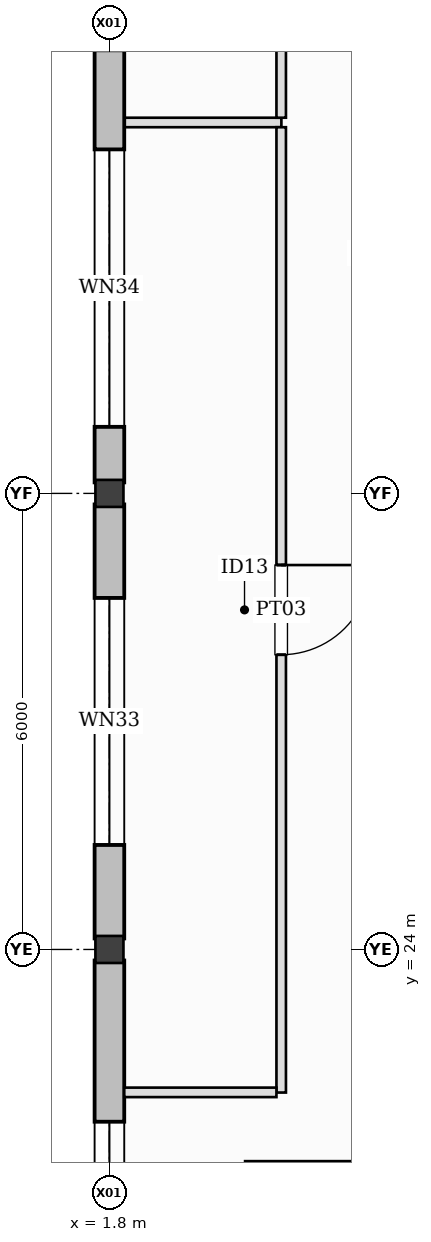
"""IFC4 building model, lengths in metres.
Left out: names, types, materials, properties, quantities, classifications, styles, units other than length and angle.
Written with IfcOpenShell. Run it as: python <this file> out.ifc"""

import sys

from ifc_helpers import new_model, si_unit, direction, frame, frame_2d, origin, origin_2d, place, context, subcontext, project, spatial, rectangle, i_section, extrude, element, fill, save


model = new_model("IFC4")
c1 = context("Model", 3, precision=1e-05, world=origin(), true_north=direction((0.0, 1.0)))
c2 = subcontext(c1, "Body", "Model", "MODEL_VIEW")
j1 = project(units=[si_unit("LENGTHUNIT", "METRE"), si_unit("PLANEANGLEUNIT", "RADIAN")], contexts=[c1])
p1 = place(None, origin())
s1 = spatial("IfcSite", under=j1, at=p1, CompositionType="ELEMENT")
p2 = place(p1, origin())
s2 = spatial("IfcBuilding", under=s1, at=p2, CompositionType="ELEMENT")
p3 = place(p2, origin())
s3 = spatial("IfcBuildingStorey", under=s2, at=p3, CompositionType="ELEMENT", Elevation=0.0)
for number, where, z_axis, x_axis in (
    (1, (1.8, 24.0, -0.41), (0.0, 0.0, 1.0), (1.0, 0.0, 0.0)),
    (2, (1.8, 30.0, -0.41), (0.0, 0.0, 1.0), (1.0, 0.0, 0.0)),
):
    element("IfcColumn", number, at=place(p3, frame(where, z_axis=z_axis, x_axis=x_axis)), inside=s3, PredefinedType="COLUMN", context=c2, shape_type="SweptSolid", body=[
        extrude(i_section(OverallWidth=0.369, OverallDepth=0.356, WebThickness=0.011, FlangeThickness=0.018, at=origin_2d()), origin(), (0.0, 0.0, 1.0), 6.41),
    ])
p4 = place(p3, frame((1.8, 23.855, 0.0), z_axis=(0.0, 0.0, 1.0), x_axis=(0.0, -1.0, 0.0)))
e3 = element("IfcWall", 3, at=p4, inside=s3, PredefinedType="STANDARD", context=c2, shape_type="SweptSolid", body=[
    extrude(rectangle(XDim=5.71, YDim=0.39, at=frame_2d((2.855, 0.0))), origin(), (0.0, 0.0, 1.0), 6.0),
])
p5 = place(p4, frame((2.121, 0.0, 1.0)))
e4 = element("IfcOpeningElement", 4, at=p5, cuts=e3, PredefinedType="OPENING", context=c2, shape_type="SweptSolid", body=[
    extrude(rectangle(XDim=2.85, YDim=1.08, at=frame_2d((1.425, 0.54))), frame((0.0, 0.205, 0.0), z_axis=(0.0, -1.0, 0.0), x_axis=(1.0, 0.0, 0.0)), (0.0, 0.0, 1.0), 0.41),
])
p6 = place(p3, frame((1.8, 29.855, 0.0), z_axis=(0.0, 0.0, 1.0), x_axis=(0.0, -1.0, 0.0)))
e5 = element("IfcWall", 5, at=p6, inside=s3, PredefinedType="STANDARD", context=c2, shape_type="SweptSolid", body=[
    extrude(rectangle(XDim=5.71, YDim=0.39, at=frame_2d((2.855, 0.0))), origin(), (0.0, 0.0, 1.0), 6.0),
])
p7 = place(p6, frame((1.23, 0.0, 1.0)))
e6 = element("IfcOpeningElement", 6, at=p7, cuts=e5, PredefinedType="OPENING", context=c2, shape_type="SweptSolid", body=[
    extrude(rectangle(XDim=3.25, YDim=1.08, at=frame_2d((1.625, 0.54))), frame((0.0, 0.205, 0.0), z_axis=(0.0, -1.0, 0.0), x_axis=(1.0, 0.0, 0.0)), (0.0, 0.0, 1.0), 0.41),
])
p8 = place(p3, frame((1.8, 35.855, 0.0), z_axis=(0.0, 0.0, 1.0), x_axis=(0.0, -1.0, 0.0)))
e7 = element("IfcWall", 7, at=p8, inside=s3, PredefinedType="STANDARD", context=c2, shape_type="SweptSolid", body=[
    extrude(rectangle(XDim=5.71, YDim=0.39, at=frame_2d((2.855, 0.0))), origin(), (0.0, 0.0, 1.0), 6.0),
])
p9 = place(p8, frame((1.329, 0.0, 1.0)))
e8 = element("IfcOpeningElement", 8, at=p9, cuts=e7, PredefinedType="OPENING", context=c2, shape_type="SweptSolid", body=[
    extrude(rectangle(XDim=3.65, YDim=1.08, at=frame_2d((1.825, 0.54))), frame((0.0, 0.205, 0.0), z_axis=(0.0, -1.0, 0.0), x_axis=(1.0, 0.0, 0.0)), (0.0, 0.0, 1.0), 0.41),
])
p10 = place(p3, frame((5.015, 21.115, 0.0), z_axis=(0.0, 0.0, 1.0), x_axis=(-1.0, 0.0, 0.0)))
e9 = element("IfcWall", 9, at=p10, inside=s3, PredefinedType="PARTITIONING", context=c2, shape_type="SweptSolid", body=[
    extrude(rectangle(XDim=1.43, YDim=0.2, at=frame_2d((0.715, 0.0))), origin(), (0.0, 0.0, 1.0), 5.68),
])
p11 = place(p3, frame((1.995, 34.88, 0.0), z_axis=(0.0, 0.0, 1.0), x_axis=(1.0, 0.0, 0.0)))
e10 = element("IfcWall", 10, at=p11, inside=s3, PredefinedType="PARTITIONING", context=c2, shape_type="SweptSolid", body=[
    extrude(rectangle(XDim=2.067, YDim=0.125, at=frame_2d((1.034, 0.0))), origin(), (0.0, 0.0, 1.0), 5.68),
])
p12 = place(p3, frame((4.06, 34.817, 0.0), z_axis=(0.0, 0.0, 1.0), x_axis=(0.0, -1.0, 0.0)))
e11 = element("IfcWall", 11, at=p12, inside=s3, PredefinedType="PARTITIONING", context=c2, shape_type="SweptSolid", body=[
    extrude(rectangle(XDim=12.7, YDim=0.125, at=frame_2d((6.35, 0.0))), origin(), (0.0, 0.0, 1.0), 5.68),
])
p13 = place(p12, frame((5.76, 0.0, 0.0)))
e12 = element("IfcOpeningElement", 12, at=p13, cuts=e11, PredefinedType="OPENING", context=c2, shape_type="SweptSolid", body=[
    extrude(rectangle(XDim=1.18, YDim=2.16, at=frame_2d((0.59, 1.08))), frame((0.0, 0.073, 0.0), z_axis=(0.0, -1.0, 0.0), x_axis=(1.0, 0.0, 0.0)), (0.0, 0.0, 1.0), 0.145),
])
p14 = place(p3, frame((3.998, 22.12, 0.0), z_axis=(0.0, 0.0, 1.0), x_axis=(-1.0, 0.0, 0.0)))
e13 = element("IfcWall", 13, at=p14, inside=s3, PredefinedType="PARTITIONING", context=c2, shape_type="SweptSolid", body=[
    extrude(rectangle(XDim=2.002, YDim=0.125, at=frame_2d((1.001, 0.0))), origin(), (0.0, 0.0, 1.0), 5.68),
])
p15 = place(p3, frame((4.06, 48.05, 0.0), z_axis=(0.0, 0.0, 1.0), x_axis=(0.0, -1.0, 0.0)))
e14 = element("IfcWall", 14, at=p15, inside=s3, PredefinedType="PARTITIONING", context=c2, shape_type="SweptSolid", body=[
    extrude(rectangle(XDim=13.108, YDim=0.125, at=frame_2d((6.554, 0.0))), origin(), (0.0, 0.0, 1.0), 5.39),
])
p16 = place(p5, origin())
e15 = element("IfcWindow", 15, at=p16, inside=s3, PartitioningType="SINGLE_PANEL", PredefinedType="WINDOW", context=c2, shape_type="SweptSolid", body=[
    extrude(rectangle(XDim=2.85, YDim=1.08, at=frame_2d((1.425, 0.54))), frame((0.0, 0.03, 0.0), z_axis=(0.0, -1.0, 0.0), x_axis=(1.0, 0.0, 0.0)), (0.0, 0.0, 1.0), 0.06),
])
fill(e4, e15)
p17 = place(p7, origin())
e16 = element("IfcWindow", 16, at=p17, inside=s3, PartitioningType="SINGLE_PANEL", PredefinedType="WINDOW", context=c2, shape_type="SweptSolid", body=[
    extrude(rectangle(XDim=3.25, YDim=1.08, at=frame_2d((1.625, 0.54))), frame((0.0, 0.03, 0.0), z_axis=(0.0, -1.0, 0.0), x_axis=(1.0, 0.0, 0.0)), (0.0, 0.0, 1.0), 0.06),
])
fill(e6, e16)
p18 = place(p9, origin())
e17 = element("IfcWindow", 17, at=p18, inside=s3, PartitioningType="SINGLE_PANEL", PredefinedType="WINDOW", context=c2, shape_type="SweptSolid", body=[
    extrude(rectangle(XDim=3.65, YDim=1.08, at=frame_2d((1.825, 0.54))), frame((0.0, 0.03, 0.0), z_axis=(0.0, -1.0, 0.0), x_axis=(1.0, 0.0, 0.0)), (0.0, 0.0, 1.0), 0.06),
])
fill(e8, e17)
p19 = place(p13, frame((1.18, 0.0, 0.0), z_axis=(0.0, 0.0, 1.0), x_axis=(-1.0, 0.0, 0.0)))
e18 = element("IfcDoor", 18, at=p19, inside=s3, OperationType="SINGLE_SWING_LEFT", PredefinedType="DOOR", context=c2, shape_type="SweptSolid", body=[
    extrude(rectangle(XDim=1.18, YDim=2.16, at=frame_2d((0.59, 1.08))), frame((0.0, 0.025, 0.0), z_axis=(0.0, -1.0, 0.0), x_axis=(1.0, 0.0, 0.0)), (0.0, 0.0, 1.0), 0.05),
])
fill(e12, e18)
save(model, sys.argv[1])
